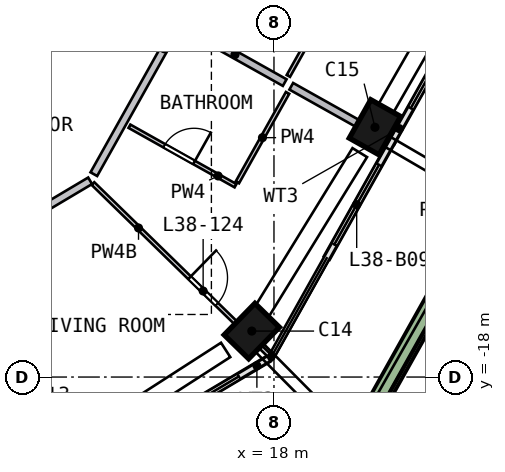
"""IFC4 building model, lengths in metres.
Left out: names, types, materials, properties, quantities, classifications, styles, units other than length and angle.
Written with IfcOpenShell. Run it as: python <this file> out.ifc"""

import sys

from ifc_helpers import new_model, si_unit, direction, frame, frame_2d, origin, origin_2d, place, context, subcontext, project, spatial, rectangle, extrude, element, fill, save


model = new_model("IFC4")
c1 = context("Model", 3, precision=1e-05, world=origin(), true_north=direction((0.0, 1.0)))
c2 = subcontext(c1, "Body", "Model", "MODEL_VIEW")
j1 = project(units=[si_unit("LENGTHUNIT", "METRE"), si_unit("PLANEANGLEUNIT", "RADIAN")], contexts=[c1])
p1 = place(None, origin())
s1 = spatial("IfcSite", under=j1, at=p1, CompositionType="ELEMENT")
p2 = place(p1, origin())
s2 = spatial("IfcBuilding", under=s1, at=p2, CompositionType="ELEMENT")
p3 = place(p2, frame((0.0, 0.0, 158.5)))
s3 = spatial("IfcBuildingStorey", under=s2, at=p3, CompositionType="ELEMENT", Elevation=158.5)
p4 = place(p3, frame((17.32, -16.89, 0.0), z_axis=(0.079675403, 0.083020554, 0.993357649), x_axis=(-0.693882614, -0.710835619, 0.115063637)))
e1 = element("IfcColumn", 1, at=p4, inside=s3, PredefinedType="COLUMN", context=c2, shape_type="SweptSolid", body=[
    extrude(rectangle(XDim=1.15, YDim=0.9, at=origin_2d()), origin(), (0.0, 0.0, 1.0), 3.211),
])
p5 = place(p3, frame((20.592, -11.546, 0.0), z_axis=(0.054147738, 0.09840895, 0.993671828), x_axis=(0.486394176, 0.866490221, -0.112318307)))
e2 = element("IfcColumn", 2, at=p5, inside=s3, PredefinedType="COLUMN", context=c2, shape_type="SweptSolid", body=[
    extrude(rectangle(XDim=1.15, YDim=0.9, at=origin_2d()), origin(), (0.0, 0.0, 1.0), 3.21),
])
p6 = place(p3, frame((5.552, -13.752, 0.0), z_axis=(0.0, 0.0, 1.0), x_axis=(0.707106781, 0.707106781, 0.0)))
e3 = element("IfcWall", 3, at=p6, inside=s3, PredefinedType="SHEAR", context=c2, shape_type="SweptSolid", body=[
    extrude(rectangle(XDim=11.598, YDim=0.7, at=frame_2d((5.799, 0.0))), origin(), (0.0, 0.0, 1.0), 3.5),
])
p7 = place(p6, frame((2.099, 0.0, 0.0)))
e4 = element("IfcOpeningElement", 4, at=p7, cuts=e3, PredefinedType="OPENING", context=c2, shape_type="SweptSolid", body=[
    extrude(rectangle(XDim=1.2, YDim=2.1, at=frame_2d((0.6, 1.05))), frame((0.0, 0.36, 0.0), z_axis=(0.0, -1.0, 0.0), x_axis=(1.0, 0.0, 0.0)), (0.0, 0.0, 1.0), 0.72),
])
p8 = place(p3, frame((14.666, -19.416, 0.0), z_axis=(0.0, 0.0, 1.0), x_axis=(0.859691314, 0.510813905, 0.0)))
e5 = element("IfcWall", 5, at=p8, inside=s3, PredefinedType="SOLIDWALL", context=c2, shape_type="SweptSolid", body=[
    extrude(rectangle(XDim=3.71, YDim=0.15, at=frame_2d((1.855, 0.0))), origin(), (0.0, 0.0, 1.0), 2.475),
])
p9 = place(p8, frame((0.4, 0.0, 0.0)))
e6 = element("IfcOpeningElement", 6, at=p9, cuts=e5, PredefinedType="OPENING", context=c2, shape_type="SweptSolid", body=[
    extrude(rectangle(XDim=2.4, YDim=2.4, at=frame_2d((1.2, 1.2))), frame((0.0, 0.085, 0.0), z_axis=(0.0, -1.0, 0.0), x_axis=(1.0, 0.0, 0.0)), (0.0, 0.0, 1.0), 0.17),
])
p10 = place(p3, frame((19.394, -14.859, 0.0), z_axis=(0.0, 0.0, 1.0), x_axis=(0.489116721, 0.872218341, 0.0)))
e7 = element("IfcWall", 7, at=p10, inside=s3, PredefinedType="SOLIDWALL", context=c2, shape_type="SweptSolid", body=[
    extrude(rectangle(XDim=3.475, YDim=0.15, at=frame_2d((1.738, 0.0))), origin(), (0.0, 0.0, 1.0), 2.475),
])
p11 = place(p10, frame((0.4, 0.0, 0.0)))
e8 = element("IfcOpeningElement", 8, at=p11, cuts=e7, PredefinedType="OPENING", context=c2, shape_type="SweptSolid", body=[
    extrude(rectangle(XDim=2.4, YDim=2.4, at=frame_2d((1.2, 1.2))), frame((0.0, 0.085, 0.0), z_axis=(0.0, -1.0, 0.0), x_axis=(1.0, 0.0, 0.0)), (0.0, 0.0, 1.0), 0.17),
])
p12 = place(p3, frame((21.094, -11.828, 0.0), z_axis=(0.0, 0.0, 1.0), x_axis=(0.489027778, 0.872268211, 0.0)))
e9 = element("IfcWall", 9, at=p12, inside=s3, PredefinedType="SOLIDWALL", context=c2, shape_type="SweptSolid", body=[
    extrude(rectangle(XDim=3.836, YDim=0.15, at=frame_2d((1.918, 0.0))), origin(), (0.0, 0.0, 1.0), 2.475),
])
p13 = place(p12, frame((1.035, 0.0, 0.0)))
e10 = element("IfcOpeningElement", 10, at=p13, cuts=e9, PredefinedType="OPENING", context=c2, shape_type="SweptSolid", body=[
    extrude(rectangle(XDim=2.4, YDim=2.4, at=frame_2d((1.2, 1.2))), frame((0.0, 0.085, 0.0), z_axis=(0.0, -1.0, 0.0), x_axis=(1.0, 0.0, 0.0)), (0.0, 0.0, 1.0), 0.17),
])
p14 = place(p3, frame((20.199, -19.608, 0.0), z_axis=(0.0, 0.0, 1.0), x_axis=(0.48906647, 0.872246518, 0.0)))
e11 = element("IfcWall", 11, at=p14, inside=s3, PredefinedType="SOLIDWALL", context=c2, shape_type="SweptSolid", body=[
    extrude(rectangle(XDim=13.723, YDim=0.5, at=frame_2d((6.862, 0.0))), origin(), (0.0, 0.0, 1.0), 0.7),
])
p15 = place(p3, frame((13.162, -12.836, 0.0), z_axis=(0.0, 0.0, 1.0), x_axis=(-0.859674935, -0.510841468, 0.0)))
e12 = element("IfcWall", 12, at=p15, inside=s3, PredefinedType="SOLIDWALL", context=c2, shape_type="SweptSolid", body=[
    extrude(rectangle(XDim=9.316, YDim=0.2, at=frame_2d((4.658, 0.0))), origin(), (0.0, 0.0, 1.0), 3.19),
])
p16 = place(p15, frame((1.9, 0.0, 0.0)))
e13 = element("IfcOpeningElement", 13, at=p16, cuts=e12, PredefinedType="OPENING", context=c2, shape_type="SweptSolid", body=[
    extrude(rectangle(XDim=1.0, YDim=2.1, at=frame_2d((0.5, 1.05))), frame((0.0, 0.11, 0.0), z_axis=(0.0, -1.0, 0.0), x_axis=(1.0, 0.0, 0.0)), (0.0, 0.0, 1.0), 0.22),
])
p17 = place(p3, frame((17.817, -4.535, 0.0), z_axis=(0.0, 0.0, 1.0), x_axis=(-0.489090048, -0.872233297, 0.0)))
e14 = element("IfcWall", 14, at=p17, inside=s3, PredefinedType="SOLIDWALL", context=c2, shape_type="SweptSolid", body=[
    extrude(rectangle(XDim=9.317, YDim=0.2, at=frame_2d((4.658, 0.0))), origin(), (0.0, 0.0, 1.0), 3.19),
])
p18 = place(p17, frame((0.55, 0.0, 0.0)))
e15 = element("IfcOpeningElement", 15, at=p18, cuts=e14, PredefinedType="OPENING", context=c2, shape_type="SweptSolid", body=[
    extrude(rectangle(XDim=1.0, YDim=2.1, at=frame_2d((0.5, 1.05))), frame((0.0, 0.11, 0.0), z_axis=(0.0, -1.0, 0.0), x_axis=(1.0, 0.0, 0.0)), (0.0, 0.0, 1.0), 0.22),
])
p19 = place(p3, frame((9.3, -15.651, 0.0), z_axis=(0.0, 0.0, 1.0), x_axis=(0.510811085, -0.859692989, 0.0)))
e16 = element("IfcWall", 16, at=p19, inside=s3, PredefinedType="SOLIDWALL", context=c2, shape_type="SweptSolid", body=[
    extrude(rectangle(XDim=5.903, YDim=0.2, at=frame_2d((2.951, 0.0))), origin(), (0.0, 0.0, 1.0), 3.19),
])
p20 = place(p3, frame((15.664, -8.783, 0.0), z_axis=(0.0, 0.0, 1.0), x_axis=(0.872228513, -0.489098581, 0.0)))
e17 = element("IfcWall", 17, at=p20, inside=s3, PredefinedType="SOLIDWALL", context=c2, shape_type="SweptSolid", body=[
    extrude(rectangle(XDim=3.002, YDim=0.2, at=frame_2d((1.501, 0.0))), origin(), (0.0, 0.0, 1.0), 3.19),
])
p21 = place(p3, frame((18.455, -10.348, 0.0), z_axis=(0.0, 0.0, 1.0), x_axis=(0.872237762, -0.489082085, 0.0)))
e18 = element("IfcWall", 18, at=p21, inside=s3, PredefinedType="SOLIDWALL", context=c2, shape_type="SweptSolid", body=[
    extrude(rectangle(XDim=2.95, YDim=0.2, at=frame_2d((1.475, 0.0))), origin(), (0.0, 0.0, 1.0), 3.19),
])
p22 = place(p3, frame((13.237, -12.908, 0.0), z_axis=(0.0, 0.0, 1.0), x_axis=(0.71592947, -0.69817261, 0.0)))
e19 = element("IfcWall", 19, at=p22, inside=s3, PredefinedType="PARTITIONING", context=c2, shape_type="SweptSolid", body=[
    extrude(rectangle(XDim=6.476, YDim=0.1, at=frame_2d((3.238, 0.0))), origin(), (0.0, 0.0, 1.0), 2.69),
])
p23 = place(p22, frame((3.55, 0.0, 0.0)))
e20 = element("IfcOpeningElement", 20, at=p23, cuts=e19, PredefinedType="OPENING", context=c2, shape_type="SweptSolid", body=[
    extrude(rectangle(XDim=1.0, YDim=2.1, at=frame_2d((0.5, 1.05))), frame((0.0, 0.06, 0.0), z_axis=(0.0, -1.0, 0.0), x_axis=(1.0, 0.0, 0.0)), (0.0, 0.0, 1.0), 0.12),
])
p24 = place(p3, frame((14.197, -11.4, 0.0), z_axis=(0.0, 0.0, 1.0), x_axis=(0.872210525, -0.489130657, 0.0)))
e21 = element("IfcWall", 21, at=p24, inside=s3, PredefinedType="PARTITIONING", context=c2, shape_type="SweptSolid", body=[
    extrude(rectangle(XDim=3.2, YDim=0.1, at=frame_2d((1.6, 0.0))), origin(), (0.0, 0.0, 1.0), 3.19),
])
p25 = place(p24, frame((1.05, 0.0, 0.0)))
e22 = element("IfcOpeningElement", 22, at=p25, cuts=e21, PredefinedType="OPENING", context=c2, shape_type="SweptSolid", body=[
    extrude(rectangle(XDim=0.9, YDim=2.1, at=frame_2d((0.45, 1.05))), frame((0.0, 0.06, 0.0), z_axis=(0.0, -1.0, 0.0), x_axis=(1.0, 0.0, 0.0)), (0.0, 0.0, 1.0), 0.12),
])
p26 = place(p3, frame((17.037, -12.878, 0.0), z_axis=(0.0, 0.0, 1.0), x_axis=(0.489063093, 0.872248411, 0.0)))
e23 = element("IfcWall", 23, at=p26, inside=s3, PredefinedType="PARTITIONING", context=c2, shape_type="SweptSolid", body=[
    extrude(rectangle(XDim=2.7, YDim=0.1, at=frame_2d((1.35, 0.0))), origin(), (0.0, 0.0, 1.0), 3.19),
])
p27 = place(p3, frame((19.552, -7.982, 0.0), z_axis=(0.0, 0.0, 1.0), x_axis=(-0.48911131, -0.872221375, 0.0)))
e24 = element("IfcWall", 24, at=p27, inside=s3, PredefinedType="PARTITIONING", context=c2, shape_type="SweptSolid", body=[
    extrude(rectangle(XDim=2.4, YDim=0.1, at=frame_2d((1.2, 0.0))), origin(), (0.0, 0.0, 1.0), 3.19),
])
p28 = place(p9, origin())
e25 = element("IfcDoor", 25, at=p28, inside=s3, OperationType="SLIDING_TO_RIGHT", PredefinedType="DOOR", context=c2, shape_type="SweptSolid", body=[
    extrude(rectangle(XDim=2.4, YDim=2.4, at=frame_2d((1.2, 1.2))), frame((0.0, 0.025, 0.0), z_axis=(0.0, -1.0, 0.0), x_axis=(1.0, 0.0, 0.0)), (0.0, 0.0, 1.0), 0.05),
])
fill(e6, e25)
p29 = place(p11, origin())
e26 = element("IfcDoor", 26, at=p29, inside=s3, OperationType="SLIDING_TO_RIGHT", PredefinedType="DOOR", context=c2, shape_type="SweptSolid", body=[
    extrude(rectangle(XDim=2.4, YDim=2.4, at=frame_2d((1.2, 1.2))), frame((0.0, 0.025, 0.0), z_axis=(0.0, -1.0, 0.0), x_axis=(1.0, 0.0, 0.0)), (0.0, 0.0, 1.0), 0.05),
])
fill(e8, e26)
p30 = place(p13, origin())
e27 = element("IfcDoor", 27, at=p30, inside=s3, OperationType="SLIDING_TO_LEFT", PredefinedType="DOOR", context=c2, shape_type="SweptSolid", body=[
    extrude(rectangle(XDim=2.4, YDim=2.4, at=frame_2d((1.2, 1.2))), frame((0.0, 0.025, 0.0), z_axis=(0.0, -1.0, 0.0), x_axis=(1.0, 0.0, 0.0)), (0.0, 0.0, 1.0), 0.05),
])
fill(e10, e27)
p31 = place(p23, origin())
e28 = element("IfcDoor", 28, at=p31, inside=s3, OperationType="SINGLE_SWING_LEFT", PredefinedType="DOOR", context=c2, shape_type="SweptSolid", body=[
    extrude(rectangle(XDim=1.0, YDim=2.1, at=frame_2d((0.5, 1.05))), frame((0.0, 0.025, 0.0), z_axis=(0.0, -1.0, 0.0), x_axis=(1.0, 0.0, 0.0)), (0.0, 0.0, 1.0), 0.05),
])
fill(e20, e28)
p32 = place(p25, origin())
e29 = element("IfcDoor", 29, at=p32, inside=s3, OperationType="SINGLE_SWING_RIGHT", PredefinedType="DOOR", context=c2, shape_type="SweptSolid", body=[
    extrude(rectangle(XDim=0.9, YDim=2.1, at=frame_2d((0.45, 1.05))), frame((0.0, 0.025, 0.0), z_axis=(0.0, -1.0, 0.0), x_axis=(1.0, 0.0, 0.0)), (0.0, 0.0, 1.0), 0.05),
])
fill(e22, e29)
save(model, sys.argv[1])
